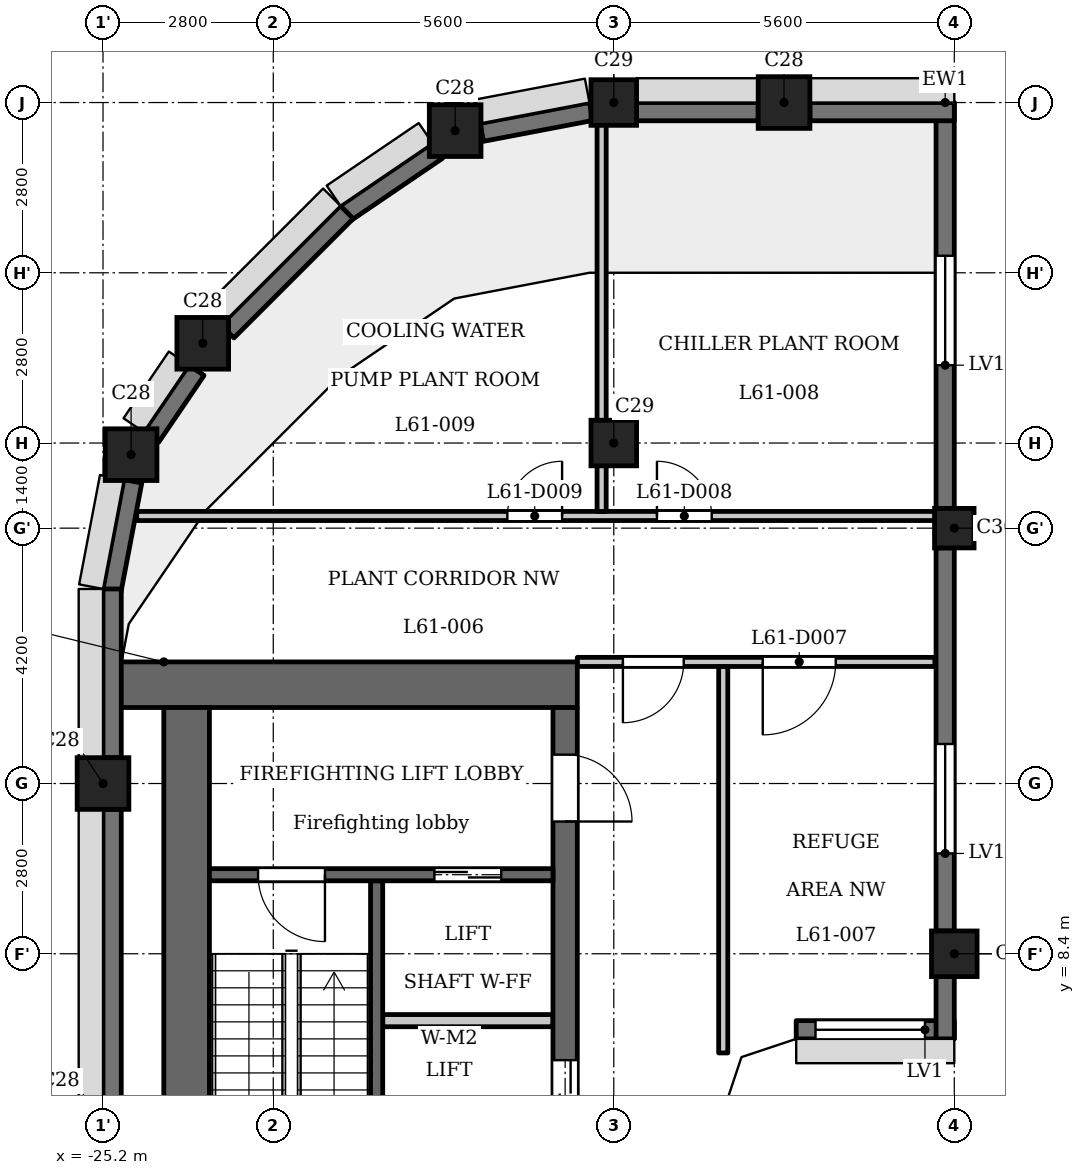
"""IFC4 building model, lengths in metres.
Left out: names, types, materials, properties, quantities, classifications, styles, units other than length and angle.
Written with IfcOpenShell. Run it as: python <this file> out.ifc"""

import sys

from ifc_helpers import new_model, si_unit, direction, frame, frame_2d, origin, origin_2d, place, context, subcontext, project, spatial, polyline, rectangle, outline, extrude, element, fill, save


model = new_model("IFC4")
c1 = context("Model", 3, precision=1e-05, world=origin(), true_north=direction((0.0, 1.0)))
c2 = subcontext(c1, "Body", "Model", "MODEL_VIEW")
j1 = project(units=[si_unit("LENGTHUNIT", "METRE"), si_unit("PLANEANGLEUNIT", "RADIAN")], contexts=[c1])
p1 = place(None, origin())
s1 = spatial("IfcSite", under=j1, at=p1, CompositionType="ELEMENT")
p2 = place(p1, origin())
s2 = spatial("IfcBuilding", under=s1, at=p2, CompositionType="ELEMENT")
p3 = place(p2, frame((0.0, 0.0, 236.3)))
s3 = spatial("IfcBuildingStorey", under=s2, at=p3, CompositionType="ELEMENT", Elevation=236.3)
for number, where, z_axis, x_axis in (
    (1, (-14.0, 22.4, 0.0), (0.0, 0.0, 1.0), (1.0, 0.0, 0.0)),
    (2, (-19.409, 21.938, 0.0), (0.0, 0.0, 1.0), (1.0, 0.0, 0.0)),
    (3, (-23.56, 18.44, 0.0), (0.0, 0.0, 1.0), (1.0, 0.0, 0.0)),
    (4, (-24.738, 16.609, 0.0), (0.0, 0.0, 1.0), (1.0, 0.0, 0.0)),
    (5, (-25.2, 11.2, 0.0), (0.0, 0.0, 1.0), (1.0, 0.0, 0.0)),
):
    element("IfcColumn", number, at=place(p3, frame(where, z_axis=z_axis, x_axis=x_axis)), inside=s3, PredefinedType="COLUMN", context=c2, shape_type="SweptSolid", body=[
        extrude(rectangle(XDim=0.85, YDim=0.85, at=origin_2d()), origin(), (0.0, 0.0, 1.0), 5.4),
    ])
for number, where, z_axis, x_axis in (
    (6, (-16.8, 16.8, 0.0), (0.0, 0.0, 1.0), (1.0, 0.0, 0.0)),
    (7, (-16.8, 22.4, 0.0), (0.0, 0.0, 1.0), (1.0, 0.0, 0.0)),
    (8, (-11.2, 8.4, 0.0), (0.0, 0.0, 1.0), (1.0, 0.0, 0.0)),
):
    element("IfcColumn", number, at=place(p3, frame(where, z_axis=z_axis, x_axis=x_axis)), inside=s3, PredefinedType="COLUMN", context=c2, shape_type="SweptSolid", body=[
        extrude(rectangle(XDim=0.75, YDim=0.75, at=origin_2d()), origin(), (0.0, 0.0, 1.0), 5.4),
    ])
p4 = place(p3, frame((-11.2, 15.4, 0.0), z_axis=(0.0, 0.0, 1.0), x_axis=(1.0, 0.0, 0.0)))
e9 = element("IfcColumn", 9, at=p4, inside=s3, PredefinedType="COLUMN", context=c2, shape_type="SweptSolid", body=[
    extrude(rectangle(XDim=0.65, YDim=0.65, at=origin_2d()), origin(), (0.0, 0.0, 1.0), 5.4),
])
p5 = place(p3, frame((-13.8, 7.15, 0.0), z_axis=(0.0, 0.0, 1.0), x_axis=(1.0, 0.0, 0.0)))
e10 = element("IfcWall", 10, at=p5, inside=s3, PredefinedType="SOLIDWALL", context=c2, shape_type="SweptSolid", body=[
    extrude(rectangle(XDim=2.6, YDim=0.3, at=frame_2d((1.3, 0.0))), origin(), (0.0, 0.0, 1.0), 4.6),
])
p6 = place(p5, frame((0.317, 0.0, 0.9)))
e11 = element("IfcOpeningElement", 11, at=p6, cuts=e10, PredefinedType="OPENING", context=c2, shape_type="SweptSolid", body=[
    extrude(rectangle(XDim=1.8, YDim=1.5, at=frame_2d((0.9, 0.75))), frame((0.0, 0.16, 0.0), z_axis=(0.0, -1.0, 0.0), x_axis=(1.0, 0.0, 0.0)), (0.0, 0.0, 1.0), 0.32),
])
p7 = place(p3, frame((-11.35, 7.0, 0.0), z_axis=(0.0, 0.0, 1.0), x_axis=(0.0, 1.0, 0.0)))
e12 = element("IfcWall", 12, at=p7, inside=s3, PredefinedType="SOLIDWALL", context=c2, shape_type="SweptSolid", body=[
    extrude(rectangle(XDim=1.025, YDim=0.3, at=frame_2d((0.512, 0.0))), origin(), (0.0, 0.0, 1.0), 4.6),
])
p8 = place(p3, frame((-11.35, 8.775, 0.0), z_axis=(0.0, 0.0, 1.0), x_axis=(0.0, 1.0, 0.0)))
e13 = element("IfcWall", 13, at=p8, inside=s3, PredefinedType="SOLIDWALL", context=c2, shape_type="SweptSolid", body=[
    extrude(rectangle(XDim=6.3, YDim=0.3, at=frame_2d((3.15, 0.0))), origin(), (0.0, 0.0, 1.0), 4.6),
])
p9 = place(p8, frame((1.275, 0.0, 0.9)))
e14 = element("IfcOpeningElement", 14, at=p9, cuts=e13, PredefinedType="OPENING", context=c2, shape_type="SweptSolid", body=[
    extrude(rectangle(XDim=1.8, YDim=1.5, at=frame_2d((0.9, 0.75))), frame((0.0, 0.16, 0.0), z_axis=(0.0, -1.0, 0.0), x_axis=(1.0, 0.0, 0.0)), (0.0, 0.0, 1.0), 0.32),
])
p10 = place(p3, frame((-11.35, 15.725, 0.0), z_axis=(0.0, 0.0, 1.0), x_axis=(0.0, 1.0, 0.0)))
e15 = element("IfcWall", 15, at=p10, inside=s3, PredefinedType="SOLIDWALL", context=c2, shape_type="SweptSolid", body=[
    extrude(rectangle(XDim=6.675, YDim=0.3, at=frame_2d((3.337, 0.0))), origin(), (0.0, 0.0, 1.0), 4.6),
])
p11 = place(p10, frame((2.355, 0.0, 0.9)))
e16 = element("IfcOpeningElement", 16, at=p11, cuts=e15, PredefinedType="OPENING", context=c2, shape_type="SweptSolid", body=[
    extrude(rectangle(XDim=1.8, YDim=1.5, at=frame_2d((0.9, 0.75))), frame((0.0, 0.16, 0.0), z_axis=(0.0, -1.0, 0.0), x_axis=(1.0, 0.0, 0.0)), (0.0, 0.0, 1.0), 0.32),
])
p12 = place(p3, frame((-11.2, 22.25, 0.0), z_axis=(0.0, 0.0, 1.0), x_axis=(-1.0, 0.0, 0.0)))
e17 = element("IfcWall", 17, at=p12, inside=s3, PredefinedType="SOLIDWALL", context=c2, shape_type="SweptSolid", body=[
    extrude(rectangle(XDim=2.375, YDim=0.3, at=frame_2d((1.188, 0.0))), origin(), (0.0, 0.0, 1.0), 4.6),
])
p13 = place(p3, frame((-14.425, 22.25, 0.0), z_axis=(0.0, 0.0, 1.0), x_axis=(-1.0, 0.0, 0.0)))
e18 = element("IfcWall", 18, at=p13, inside=s3, PredefinedType="SOLIDWALL", context=c2, shape_type="SweptSolid", body=[
    extrude(rectangle(XDim=2.0, YDim=0.3, at=frame_2d((1.0, 0.0))), origin(), (0.0, 0.0, 1.0), 2.6),
])
p14 = place(p3, frame((-17.172, 22.253, 0.0), z_axis=(0.0, 0.0, 1.0), x_axis=(-0.982300037503, -0.187314271538, 0.0)))
e19 = element("IfcWall", 19, at=p14, inside=s3, PredefinedType="SOLIDWALL", context=c2, shape_type="SweptSolid", body=[
    extrude(rectangle(XDim=1.831, YDim=0.3, at=frame_2d((0.916, 0.0))), origin(), (0.0, 0.0, 1.0), 2.6),
])
p15 = place(p3, frame((-19.698, 21.608, 0.0), z_axis=(0.0, 0.0, 1.0), x_axis=(-0.82705295608, -0.562124014644, 0.0)))
e20 = element("IfcWall", 20, at=p15, inside=s3, PredefinedType="SOLIDWALL", context=c2, shape_type="SweptSolid", body=[
    extrude(rectangle(XDim=1.831, YDim=0.3, at=frame_2d((0.916, 0.0))), origin(), (0.0, 0.0, 1.0), 2.6),
])
p16 = place(p3, frame((-21.191, 20.597, 0.0), z_axis=(0.0, 0.0, 1.0), x_axis=(-0.707150767798, -0.707062791838, 0.0)))
e21 = element("IfcWall", 21, at=p16, inside=s3, PredefinedType="SOLIDWALL", context=c2, shape_type="SweptSolid", body=[
    extrude(rectangle(XDim=2.775, YDim=0.3, at=frame_2d((1.388, 0.0))), origin(), (0.0, 0.0, 1.0), 2.6),
])
p17 = place(p3, frame((-23.662, 17.996, 0.0), z_axis=(0.0, 0.0, 1.0), x_axis=(-0.562149004813, -0.827035970432, 0.0)))
e22 = element("IfcWall", 22, at=p17, inside=s3, PredefinedType="SOLIDWALL", context=c2, shape_type="SweptSolid", body=[
    extrude(rectangle(XDim=1.327, YDim=0.3, at=frame_2d((0.664, 0.0))), origin(), (0.0, 0.0, 1.0), 2.6),
])
p18 = place(p3, frame((-24.709, 16.171, 0.0), z_axis=(0.0, 0.0, 1.0), x_axis=(-0.187442908742, -0.982275499014, 0.0)))
e23 = element("IfcWall", 23, at=p18, inside=s3, PredefinedType="SOLIDWALL", context=c2, shape_type="SweptSolid", body=[
    extrude(rectangle(XDim=1.831, YDim=0.3, at=frame_2d((0.916, 0.0))), origin(), (0.0, 0.0, 1.0), 2.6),
])
p19 = place(p3, frame((-25.05, 14.4, 0.0), z_axis=(0.0, 0.0, 1.0), x_axis=(0.0, -1.0, 0.0)))
e24 = element("IfcWall", 24, at=p19, inside=s3, PredefinedType="SOLIDWALL", context=c2, shape_type="SweptSolid", body=[
    extrude(rectangle(XDim=2.775, YDim=0.3, at=frame_2d((1.387, 0.0))), origin(), (0.0, 0.0, 1.0), 2.6),
])
p20 = place(p3, frame((-25.05, 10.775, 0.0), z_axis=(0.0, 0.0, 1.0), x_axis=(0.0, -1.0, 0.0)))
e25 = element("IfcWall", 25, at=p20, inside=s3, PredefinedType="SOLIDWALL", context=c2, shape_type="SweptSolid", body=[
    extrude(rectangle(XDim=4.75, YDim=0.3, at=frame_2d((2.375, 0.0))), origin(), (0.0, 0.0, 1.0), 2.6),
])
p21 = place(p3, frame((-20.7, 2.6, 0.0), z_axis=(0.0, 0.0, 1.0), x_axis=(0.0, 1.0, 0.0)))
e26 = element("IfcWall", 26, at=p21, inside=s3, PredefinedType="SHEAR", context=c2, shape_type="SweptSolid", body=[
    extrude(rectangle(XDim=7.0, YDim=0.2, at=frame_2d((3.5, 0.0))), origin(), (0.0, 0.0, 1.0), 4.6),
])
p22 = place(p3, frame((-17.4, 12.825, 0.0), z_axis=(0.0, 0.0, 1.0), x_axis=(-1.0, 0.0, 0.0)))
e27 = element("IfcWall", 27, at=p22, inside=s3, PredefinedType="SHEAR", context=c2, shape_type="SweptSolid", body=[
    extrude(rectangle(XDim=7.6, YDim=0.75, at=frame_2d((3.8, 0.0))), origin(), (0.0, 0.0, 1.0), 4.6),
])
p23 = place(p3, frame((-17.6, -12.45, 0.0), z_axis=(0.0, 0.0, 1.0), x_axis=(0.0, 1.0, 0.0)))
e28 = element("IfcWall", 28, at=p23, inside=s3, PredefinedType="SHEAR", context=c2, shape_type="SweptSolid", body=[
    extrude(rectangle(XDim=24.9, YDim=0.4, at=frame_2d((12.45, 0.0))), origin(), (0.0, 0.0, 1.0), 4.6),
])
p24 = place(p23, frame((11.05, 0.0, 0.0)))
e29 = element("IfcOpeningElement", 29, at=p24, cuts=e28, PredefinedType="OPENING", context=c2, shape_type="SweptSolid", body=[
    extrude(rectangle(XDim=0.9, YDim=2.1, at=frame_2d((0.45, 1.05))), frame((0.0, 0.21, 0.0), z_axis=(0.0, -1.0, 0.0), x_axis=(1.0, 0.0, 0.0)), (0.0, 0.0, 1.0), 0.42),
])
p25 = place(p23, frame((15.6, 0.0, 0.0)))
e30 = element("IfcOpeningElement", 30, at=p25, cuts=e28, PredefinedType="OPENING", context=c2, shape_type="SweptSolid", body=[
    extrude(rectangle(XDim=1.1, YDim=2.1, at=frame_2d((0.55, 1.05))), frame((0.0, 0.21, 0.0), z_axis=(0.0, -1.0, 0.0), x_axis=(1.0, 0.0, 0.0)), (0.0, 0.0, 1.0), 0.42),
])
p26 = place(p23, frame((18.0, 0.0, 0.0)))
e31 = element("IfcOpeningElement", 31, at=p26, cuts=e28, PredefinedType="OPENING", context=c2, shape_type="SweptSolid", body=[
    extrude(rectangle(XDim=1.1, YDim=2.1, at=frame_2d((0.55, 1.05))), frame((0.0, 0.21, 0.0), z_axis=(0.0, -1.0, 0.0), x_axis=(1.0, 0.0, 0.0)), (0.0, 0.0, 1.0), 0.42),
])
p27 = place(p23, frame((23.025, 0.0, 0.0)))
e32 = element("IfcOpeningElement", 32, at=p27, cuts=e28, PredefinedType="OPENING", context=c2, shape_type="SweptSolid", body=[
    extrude(rectangle(XDim=1.1, YDim=2.1, at=frame_2d((0.55, 1.05))), frame((0.0, 0.21, 0.0), z_axis=(0.0, -1.0, 0.0), x_axis=(1.0, 0.0, 0.0)), (0.0, 0.0, 1.0), 0.42),
])
p28 = place(p23, frame((0.775, 0.0, 0.0)))
e33 = element("IfcOpeningElement", 33, at=p28, cuts=e28, PredefinedType="OPENING", context=c2, shape_type="SweptSolid", body=[
    extrude(rectangle(XDim=1.1, YDim=2.1, at=frame_2d((0.55, 1.05))), frame((0.0, 0.21, 0.0), z_axis=(0.0, -1.0, 0.0), x_axis=(1.0, 0.0, 0.0)), (0.0, 0.0, 1.0), 0.42),
])
p29 = place(p23, frame((12.925, 0.0, 0.0)))
e34 = element("IfcOpeningElement", 34, at=p29, cuts=e28, PredefinedType="OPENING", context=c2, shape_type="SweptSolid", body=[
    extrude(rectangle(XDim=1.8, YDim=2.1, at=frame_2d((0.9, 1.05))), frame((0.0, 0.21, 0.0), z_axis=(0.0, -1.0, 0.0), x_axis=(1.0, 0.0, 0.0)), (0.0, 0.0, 1.0), 0.42),
])
p30 = place(p3, frame((-23.825, -12.45, 0.0), z_axis=(0.0, 0.0, 1.0), x_axis=(0.0, 1.0, 0.0)))
e35 = element("IfcWall", 35, at=p30, inside=s3, PredefinedType="SHEAR", context=c2, shape_type="SweptSolid", body=[
    extrude(rectangle(XDim=24.9, YDim=0.75, at=frame_2d((12.45, 0.0))), origin(), (0.0, 0.0, 1.0), 4.6),
])
p31 = place(p3, frame((-17.8, 7.3, 0.0), z_axis=(0.0, 0.0, 1.0), x_axis=(-1.0, 0.0, 0.0)))
e36 = element("IfcWall", 36, at=p31, inside=s3, PredefinedType="PARTITIONING", context=c2, shape_type="SweptSolid", body=[
    extrude(rectangle(XDim=2.8, YDim=0.2, at=frame_2d((1.4, 0.0))), origin(), (0.0, 0.0, 1.0), 4.6),
])
p32 = place(p3, frame((-17.8, 9.7, 0.0), z_axis=(0.0, 0.0, 1.0), x_axis=(-1.0, 0.0, 0.0)))
e37 = element("IfcWall", 37, at=p32, inside=s3, PredefinedType="SHEAR", context=c2, shape_type="SweptSolid", body=[
    extrude(rectangle(XDim=5.65, YDim=0.2, at=frame_2d((2.825, 0.0))), origin(), (0.0, 0.0, 1.0), 4.6),
])
p33 = place(p32, frame((0.85, 0.0, 0.0)))
e38 = element("IfcOpeningElement", 38, at=p33, cuts=e37, PredefinedType="OPENING", context=c2, shape_type="SweptSolid", body=[
    extrude(rectangle(XDim=1.1, YDim=2.1, at=frame_2d((0.55, 1.05))), frame((0.0, 0.11, 0.0), z_axis=(0.0, -1.0, 0.0), x_axis=(1.0, 0.0, 0.0)), (0.0, 0.0, 1.0), 0.22),
])
p34 = place(p32, frame((3.75, 0.0, 0.0)))
e39 = element("IfcOpeningElement", 39, at=p34, cuts=e37, PredefinedType="OPENING", context=c2, shape_type="SweptSolid", body=[
    extrude(rectangle(XDim=1.1, YDim=2.1, at=frame_2d((0.55, 1.05))), frame((0.0, 0.11, 0.0), z_axis=(0.0, -1.0, 0.0), x_axis=(1.0, 0.0, 0.0)), (0.0, 0.0, 1.0), 0.22),
])
p35 = place(p3, frame((-17.4, 13.2, 0.0), z_axis=(0.0, 0.0, 1.0), x_axis=(1.0, 0.0, 0.0)))
e40 = element("IfcWall", 40, at=p35, inside=s3, PredefinedType="PARTITIONING", context=c2, shape_type="SweptSolid", body=[
    extrude(rectangle(XDim=5.88, YDim=0.15, at=frame_2d((2.94, 0.0))), origin(), (0.0, 0.0, 1.0), 4.6),
])
p36 = place(p35, frame((0.75, 0.0, 0.0)))
e41 = element("IfcOpeningElement", 41, at=p36, cuts=e40, PredefinedType="OPENING", context=c2, shape_type="SweptSolid", body=[
    extrude(rectangle(XDim=1.0, YDim=2.1, at=frame_2d((0.5, 1.05))), frame((0.0, 0.085, 0.0), z_axis=(0.0, -1.0, 0.0), x_axis=(1.0, 0.0, 0.0)), (0.0, 0.0, 1.0), 0.17),
])
p37 = place(p35, frame((3.05, 0.0, 0.0)))
e42 = element("IfcOpeningElement", 42, at=p37, cuts=e40, PredefinedType="OPENING", context=c2, shape_type="SweptSolid", body=[
    extrude(rectangle(XDim=1.2, YDim=2.1, at=frame_2d((0.6, 1.05))), frame((0.0, 0.085, 0.0), z_axis=(0.0, -1.0, 0.0), x_axis=(1.0, 0.0, 0.0)), (0.0, 0.0, 1.0), 0.17),
])
p38 = place(p3, frame((-24.646, 15.6, 0.0), z_axis=(0.0, 0.0, 1.0), x_axis=(1.0, 0.0, 0.0)))
e43 = element("IfcWall", 43, at=p38, inside=s3, PredefinedType="PARTITIONING", context=c2, shape_type="SweptSolid", body=[
    extrude(rectangle(XDim=13.356, YDim=0.15, at=frame_2d((6.678, 0.0))), origin(), (0.0, 0.0, 1.0), 4.6),
])
p39 = place(p38, frame((8.556, 0.0, 0.0)))
e44 = element("IfcOpeningElement", 44, at=p39, cuts=e43, PredefinedType="OPENING", context=c2, shape_type="SweptSolid", body=[
    extrude(rectangle(XDim=0.9, YDim=2.1, at=frame_2d((0.45, 1.05))), frame((0.0, 0.085, 0.0), z_axis=(0.0, -1.0, 0.0), x_axis=(1.0, 0.0, 0.0)), (0.0, 0.0, 1.0), 0.17),
])
p40 = place(p38, frame((6.096, 0.0, 0.0)))
e45 = element("IfcOpeningElement", 45, at=p40, cuts=e43, PredefinedType="OPENING", context=c2, shape_type="SweptSolid", body=[
    extrude(rectangle(XDim=0.9, YDim=2.1, at=frame_2d((0.45, 1.05))), frame((0.0, 0.085, 0.0), z_axis=(0.0, -1.0, 0.0), x_axis=(1.0, 0.0, 0.0)), (0.0, 0.0, 1.0), 0.17),
])
p41 = place(p3, frame((-17.0, 15.675, 0.0), z_axis=(0.0, 0.0, 1.0), x_axis=(0.0, 1.0, 0.0)))
e46 = element("IfcWall", 46, at=p41, inside=s3, PredefinedType="PARTITIONING", context=c2, shape_type="SweptSolid", body=[
    extrude(rectangle(XDim=6.635, YDim=0.15, at=frame_2d((3.317, 0.0))), origin(), (0.0, 0.0, 1.0), 3.95),
])
p42 = place(p3, frame((-15.0, 6.769, 0.0), z_axis=(0.0, 0.0, 1.0), x_axis=(0.0, 1.0, 0.0)))
e47 = element("IfcWall", 47, at=p42, inside=s3, PredefinedType="PARTITIONING", context=c2, shape_type="SweptSolid", body=[
    extrude(rectangle(XDim=6.356, YDim=0.15, at=frame_2d((3.178, 0.0))), origin(), (0.0, 0.0, 1.0), 4.6),
])
p43 = place(p3, origin())
e48 = element("IfcWall", 48, at=p43, inside=s3, PredefinedType="SOLIDWALL", context=c2, shape_type="SweptSolid", body=[
    extrude(outline(polyline([(-15.0, 5.8), (-14.7, 6.7), (-13.8, 7.0), (-13.8, 7.3), (-13.849, 7.3), (-14.937, 6.937), (-15.3, 5.849), (-15.3, 5.8), (-15.0, 5.8)])), origin(), (0.0, 0.0, 1.0), 4.6),
])
p44 = place(p26, origin())
e49 = element("IfcDoor", 49, at=p44, inside=s3, OperationType="DOUBLE_DOOR_SLIDING", PredefinedType="DOOR", context=c2, shape_type="SweptSolid", body=[
    extrude(rectangle(XDim=1.1, YDim=2.1, at=frame_2d((0.55, 1.05))), frame((0.0, 0.025, 0.0), z_axis=(0.0, -1.0, 0.0), x_axis=(1.0, 0.0, 0.0)), (0.0, 0.0, 1.0), 0.05),
])
fill(e31, e49)
p45 = place(p33, origin())
e50 = element("IfcDoor", 50, at=p45, inside=s3, OperationType="DOUBLE_DOOR_SLIDING", PredefinedType="DOOR", context=c2, shape_type="SweptSolid", body=[
    extrude(rectangle(XDim=1.1, YDim=2.1, at=frame_2d((0.55, 1.05))), frame((0.0, 0.025, 0.0), z_axis=(0.0, -1.0, 0.0), x_axis=(1.0, 0.0, 0.0)), (0.0, 0.0, 1.0), 0.05),
])
fill(e38, e50)
p46 = place(p27, origin())
e51 = element("IfcDoor", 51, at=p46, inside=s3, OperationType="SINGLE_SWING_LEFT", PredefinedType="DOOR", context=c2, shape_type="SweptSolid", body=[
    extrude(rectangle(XDim=1.1, YDim=2.1, at=frame_2d((0.55, 1.05))), frame((0.0, 0.025, 0.0), z_axis=(0.0, -1.0, 0.0), x_axis=(1.0, 0.0, 0.0)), (0.0, 0.0, 1.0), 0.05),
])
fill(e32, e51)
p47 = place(p34, origin())
e52 = element("IfcDoor", 52, at=p47, inside=s3, OperationType="SINGLE_SWING_RIGHT", PredefinedType="DOOR", context=c2, shape_type="SweptSolid", body=[
    extrude(rectangle(XDim=1.1, YDim=2.1, at=frame_2d((0.55, 1.05))), frame((0.0, 0.025, 0.0), z_axis=(0.0, -1.0, 0.0), x_axis=(1.0, 0.0, 0.0)), (0.0, 0.0, 1.0), 0.05),
])
fill(e39, e52)
p48 = place(p36, origin())
e53 = element("IfcDoor", 53, at=p48, inside=s3, OperationType="SINGLE_SWING_LEFT", PredefinedType="DOOR", context=c2, shape_type="SweptSolid", body=[
    extrude(rectangle(XDim=1.0, YDim=2.1, at=frame_2d((0.5, 1.05))), frame((0.0, 0.025, 0.0), z_axis=(0.0, -1.0, 0.0), x_axis=(1.0, 0.0, 0.0)), (0.0, 0.0, 1.0), 0.05),
])
fill(e41, e53)
p49 = place(p37, origin())
e54 = element("IfcDoor", 54, at=p49, inside=s3, OperationType="SINGLE_SWING_LEFT", PredefinedType="DOOR", context=c2, shape_type="SweptSolid", body=[
    extrude(rectangle(XDim=1.2, YDim=2.1, at=frame_2d((0.6, 1.05))), frame((0.0, 0.025, 0.0), z_axis=(0.0, -1.0, 0.0), x_axis=(1.0, 0.0, 0.0)), (0.0, 0.0, 1.0), 0.05),
])
fill(e42, e54)
p50 = place(p39, origin())
e55 = element("IfcDoor", 55, at=p50, inside=s3, OperationType="SINGLE_SWING_RIGHT", PredefinedType="DOOR", context=c2, shape_type="SweptSolid", body=[
    extrude(rectangle(XDim=0.9, YDim=2.1, at=frame_2d((0.45, 1.05))), frame((0.0, 0.025, 0.0), z_axis=(0.0, -1.0, 0.0), x_axis=(1.0, 0.0, 0.0)), (0.0, 0.0, 1.0), 0.05),
])
fill(e44, e55)
p51 = place(p40, origin())
e56 = element("IfcDoor", 56, at=p51, inside=s3, OperationType="SINGLE_SWING_LEFT", PredefinedType="DOOR", context=c2, shape_type="SweptSolid", body=[
    extrude(rectangle(XDim=0.9, YDim=2.1, at=frame_2d((0.45, 1.05))), frame((0.0, 0.025, 0.0), z_axis=(0.0, -1.0, 0.0), x_axis=(1.0, 0.0, 0.0)), (0.0, 0.0, 1.0), 0.05),
])
fill(e45, e56)
p52 = place(p6, origin())
e57 = element("IfcWindow", 57, at=p52, inside=s3, PartitioningType="SINGLE_PANEL", PredefinedType="WINDOW", context=c2, shape_type="SweptSolid", body=[
    extrude(rectangle(XDim=1.8, YDim=1.5, at=frame_2d((0.9, 0.75))), frame((0.0, 0.03, 0.0), z_axis=(0.0, -1.0, 0.0), x_axis=(1.0, 0.0, 0.0)), (0.0, 0.0, 1.0), 0.06),
])
fill(e11, e57)
p53 = place(p9, origin())
e58 = element("IfcWindow", 58, at=p53, inside=s3, PartitioningType="SINGLE_PANEL", PredefinedType="WINDOW", context=c2, shape_type="SweptSolid", body=[
    extrude(rectangle(XDim=1.8, YDim=1.5, at=frame_2d((0.9, 0.75))), frame((0.0, 0.03, 0.0), z_axis=(0.0, -1.0, 0.0), x_axis=(1.0, 0.0, 0.0)), (0.0, 0.0, 1.0), 0.06),
])
fill(e14, e58)
p54 = place(p11, origin())
e59 = element("IfcWindow", 59, at=p54, inside=s3, PartitioningType="SINGLE_PANEL", PredefinedType="WINDOW", context=c2, shape_type="SweptSolid", body=[
    extrude(rectangle(XDim=1.8, YDim=1.5, at=frame_2d((0.9, 0.75))), frame((0.0, 0.03, 0.0), z_axis=(0.0, -1.0, 0.0), x_axis=(1.0, 0.0, 0.0)), (0.0, 0.0, 1.0), 0.06),
])
fill(e16, e59)
save(model, sys.argv[1])
